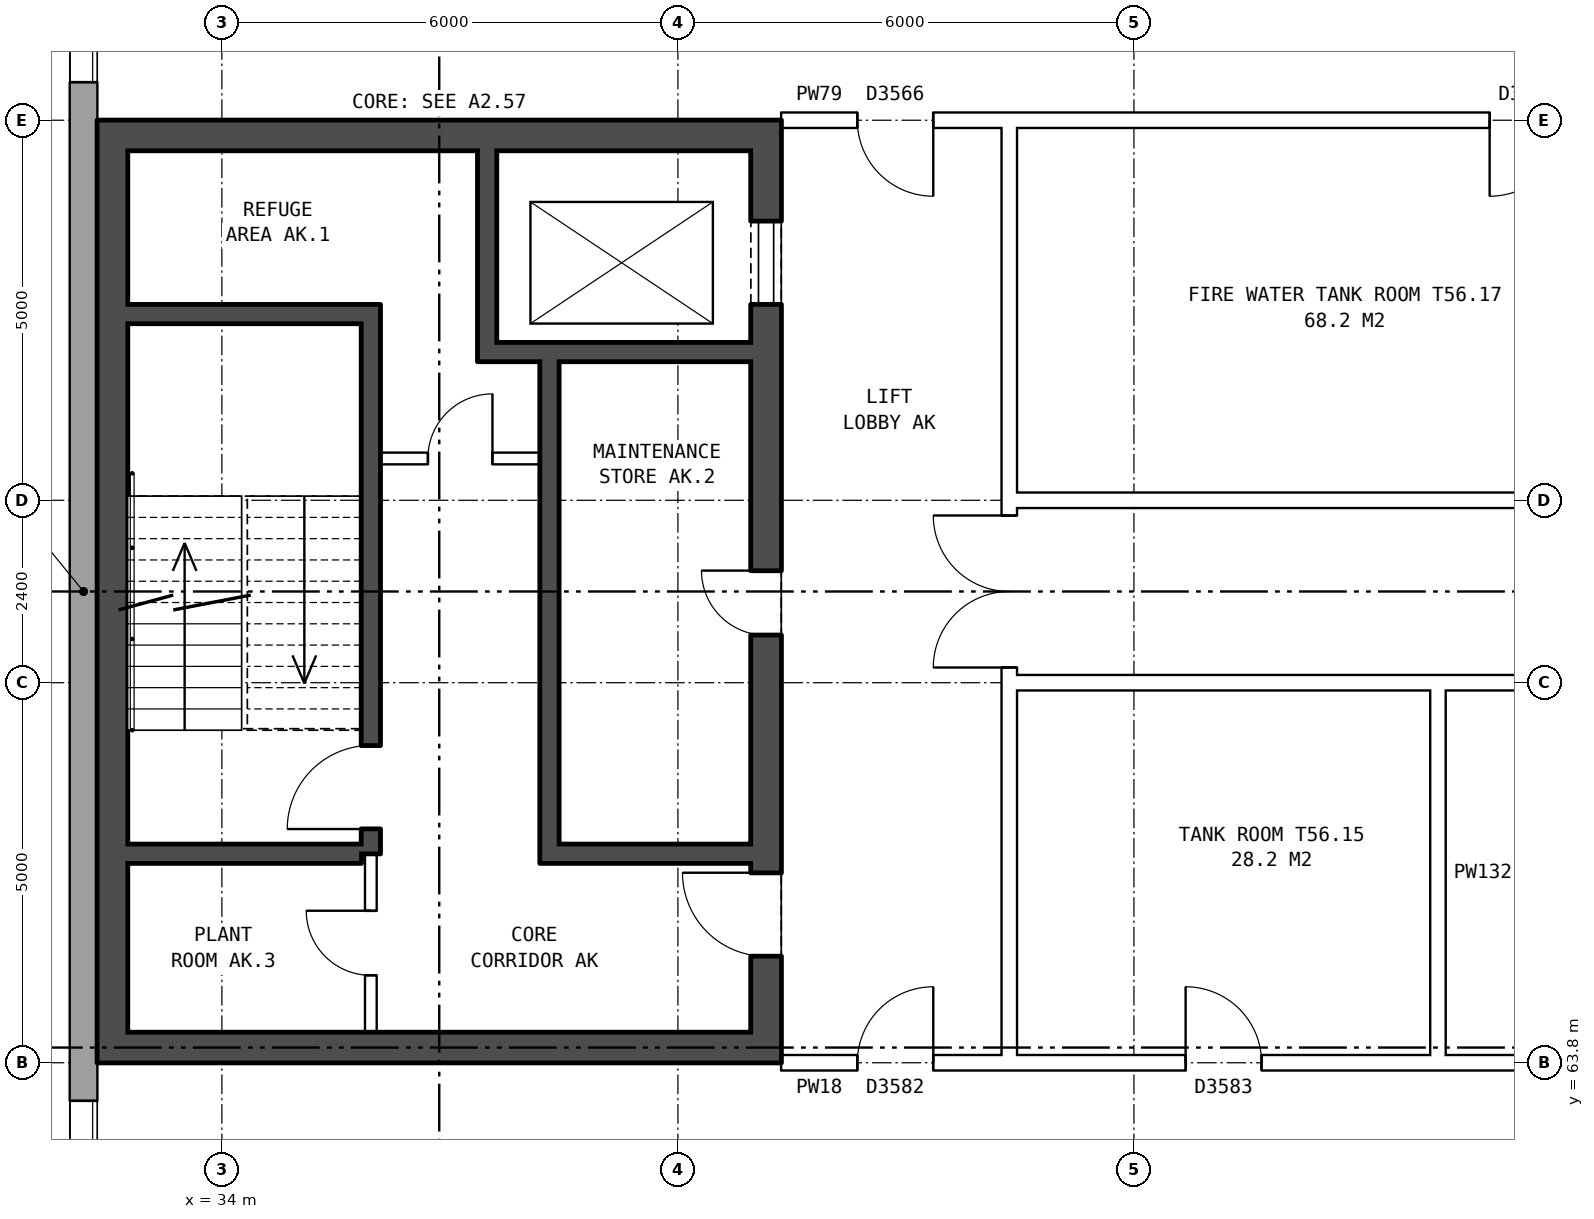
"""IFC4 building model, lengths in metres.
Left out: names, types, materials, properties, quantities, classifications, styles, units other than length and angle.
Written with IfcOpenShell. Run it as: python <this file> out.ifc"""

import sys

from ifc_helpers import new_model, si_unit, direction, frame, frame_2d, origin, place, context, subcontext, project, spatial, rectangle, extrude, element, fill, save


model = new_model("IFC4")
c1 = context("Model", 3, precision=1e-05, world=origin(), true_north=direction((0.0, 1.0)))
c2 = subcontext(c1, "Body", "Model", "MODEL_VIEW")
j1 = project(units=[si_unit("LENGTHUNIT", "METRE"), si_unit("PLANEANGLEUNIT", "RADIAN")], contexts=[c1])
p1 = place(None, origin())
s1 = spatial("IfcSite", under=j1, at=p1, CompositionType="ELEMENT")
p2 = place(p1, origin())
s2 = spatial("IfcBuilding", under=s1, at=p2, CompositionType="ELEMENT")
p3 = place(p2, frame((0.0, 0.0, 198.6)))
s3 = spatial("IfcBuildingStorey", under=s2, at=p3, CompositionType="ELEMENT", Elevation=198.6)
p4 = place(p3, frame((32.18, 82.925, 0.0), z_axis=(0.0, 0.0, 1.0), x_axis=(0.0, -1.0, 0.0)))
e1 = element("IfcWall", 1, at=p4, inside=s3, PredefinedType="STANDARD", context=c2, shape_type="SweptSolid", body=[
    extrude(rectangle(XDim=25.851, YDim=0.36, at=frame_2d((12.925, 0.0))), origin(), (0.0, 0.0, 1.0), 3.7),
])
p5 = place(p4, frame((1.625, 0.0, 1.5)))
e2 = element("IfcOpeningElement", 2, at=p5, cuts=e1, PredefinedType="OPENING", context=c2, shape_type="SweptSolid", body=[
    extrude(rectangle(XDim=1.6, YDim=1.2, at=frame_2d((0.8, 0.6))), frame((0.0, 0.19, 0.0), z_axis=(0.0, -1.0, 0.0), x_axis=(1.0, 0.0, 0.0)), (0.0, 0.0, 1.0), 0.38),
])
p6 = place(p4, frame((4.625, 0.0, 1.5)))
e3 = element("IfcOpeningElement", 3, at=p6, cuts=e1, PredefinedType="OPENING", context=c2, shape_type="SweptSolid", body=[
    extrude(rectangle(XDim=1.6, YDim=1.2, at=frame_2d((0.8, 0.6))), frame((0.0, 0.19, 0.0), z_axis=(0.0, -1.0, 0.0), x_axis=(1.0, 0.0, 0.0)), (0.0, 0.0, 1.0), 0.38),
])
p7 = place(p4, frame((19.625, 0.0, 1.5)))
e4 = element("IfcOpeningElement", 4, at=p7, cuts=e1, PredefinedType="OPENING", context=c2, shape_type="SweptSolid", body=[
    extrude(rectangle(XDim=1.6, YDim=1.2, at=frame_2d((0.8, 0.6))), frame((0.0, 0.19, 0.0), z_axis=(0.0, -1.0, 0.0), x_axis=(1.0, 0.0, 0.0)), (0.0, 0.0, 1.0), 0.38),
])
p8 = place(p4, frame((22.625, 0.0, 1.5)))
e5 = element("IfcOpeningElement", 5, at=p8, cuts=e1, PredefinedType="OPENING", context=c2, shape_type="SweptSolid", body=[
    extrude(rectangle(XDim=1.6, YDim=1.2, at=frame_2d((0.8, 0.6))), frame((0.0, 0.19, 0.0), z_axis=(0.0, -1.0, 0.0), x_axis=(1.0, 0.0, 0.0)), (0.0, 0.0, 1.0), 0.38),
])
p9 = place(p3, frame((41.16, 76.2, 0.0), z_axis=(0.0, 0.0, 1.0), x_axis=(0.0, -1.0, 0.0)))
e6 = element("IfcWall", 6, at=p9, inside=s3, PredefinedType="SHEAR", context=c2, shape_type="SweptSolid", body=[
    extrude(rectangle(XDim=12.4, YDim=0.4, at=frame_2d((6.2, 0.0))), origin(), (0.0, 0.0, 1.0), 3.7),
])
p10 = place(p9, frame((1.325, 0.0, 0.0)))
e7 = element("IfcOpeningElement", 7, at=p10, cuts=e6, PredefinedType="OPENING", context=c2, shape_type="SweptSolid", body=[
    extrude(rectangle(XDim=1.1, YDim=2.1, at=frame_2d((0.55, 1.05))), frame((0.0, 0.21, 0.0), z_axis=(0.0, -1.0, 0.0), x_axis=(1.0, 0.0, 0.0)), (0.0, 0.0, 1.0), 0.42),
])
p11 = place(p9, frame((5.925, 0.0, 0.0)))
e8 = element("IfcOpeningElement", 8, at=p11, cuts=e6, PredefinedType="OPENING", context=c2, shape_type="SweptSolid", body=[
    extrude(rectangle(XDim=0.85, YDim=2.1, at=frame_2d((0.425, 1.05))), frame((0.0, 0.21, 0.0), z_axis=(0.0, -1.0, 0.0), x_axis=(1.0, 0.0, 0.0)), (0.0, 0.0, 1.0), 0.42),
])
p12 = place(p9, frame((9.9, 0.0, 0.0)))
e9 = element("IfcOpeningElement", 9, at=p12, cuts=e6, PredefinedType="OPENING", context=c2, shape_type="SweptSolid", body=[
    extrude(rectangle(XDim=1.1, YDim=2.1, at=frame_2d((0.55, 1.05))), frame((0.0, 0.21, 0.0), z_axis=(0.0, -1.0, 0.0), x_axis=(1.0, 0.0, 0.0)), (0.0, 0.0, 1.0), 0.42),
])
p13 = place(p3, frame((32.56, 76.2, 0.0), z_axis=(0.0, 0.0, 1.0), x_axis=(0.0, -1.0, 0.0)))
e10 = element("IfcWall", 10, at=p13, inside=s3, PredefinedType="SHEAR", context=c2, shape_type="SweptSolid", body=[
    extrude(rectangle(XDim=12.4, YDim=0.4, at=frame_2d((6.2, 0.0))), origin(), (0.0, 0.0, 1.0), 3.7),
])
for number, where, z_axis, x_axis in (
    (11, (40.96, 76.0, 0.0), (0.0, 0.0, 1.0), (-1.0, 0.0, 0.0)),
    (12, (40.96, 64.0, 0.0), (0.0, 0.0, 1.0), (-1.0, 0.0, 0.0)),
):
    element("IfcWall", number, at=place(p3, frame(where, z_axis=z_axis, x_axis=x_axis)), inside=s3, PredefinedType="SHEAR", context=c2, shape_type="SweptSolid", body=[
        extrude(rectangle(XDim=8.2, YDim=0.4, at=frame_2d((4.1, 0.0))), origin(), (0.0, 0.0, 1.0), 3.7),
    ])
p14 = place(p3, frame((35.835, 73.65, 0.0), z_axis=(0.0, 0.0, 1.0), x_axis=(-1.0, 0.0, 0.0)))
e13 = element("IfcWall", 13, at=p14, inside=s3, PredefinedType="SHEAR", context=c2, shape_type="SweptSolid", body=[
    extrude(rectangle(XDim=3.075, YDim=0.25, at=frame_2d((1.538, 0.0))), origin(), (0.0, 0.0, 1.0), 3.7),
])
p15 = place(p3, frame((40.96, 73.15, 0.0), z_axis=(0.0, 0.0, 1.0), x_axis=(-1.0, 0.0, 0.0)))
e14 = element("IfcWall", 14, at=p15, inside=s3, PredefinedType="SHEAR", context=c2, shape_type="SweptSolid", body=[
    extrude(rectangle(XDim=3.595, YDim=0.25, at=frame_2d((1.797, 0.0))), origin(), (0.0, 0.0, 1.0), 3.7),
])
p16 = place(p3, frame((38.185, 71.75, 0.0), z_axis=(0.0, 0.0, 1.0), x_axis=(-1.0, 0.0, 0.0)))
e15 = element("IfcWall", 15, at=p16, inside=s3, PredefinedType="PARTITIONING", context=c2, shape_type="SweptSolid", body=[
    extrude(rectangle(XDim=2.1, YDim=0.15, at=frame_2d((1.05, 0.0))), origin(), (0.0, 0.0, 1.0), 3.7),
])
p17 = place(p16, frame((0.625, 0.0, 0.0)))
e16 = element("IfcOpeningElement", 16, at=p17, cuts=e15, PredefinedType="OPENING", context=c2, shape_type="SweptSolid", body=[
    extrude(rectangle(XDim=0.85, YDim=2.1, at=frame_2d((0.425, 1.05))), frame((0.0, 0.085, 0.0), z_axis=(0.0, -1.0, 0.0), x_axis=(1.0, 0.0, 0.0)), (0.0, 0.0, 1.0), 0.17),
])
p18 = place(p3, frame((40.96, 66.55, 0.0), z_axis=(0.0, 0.0, 1.0), x_axis=(-1.0, 0.0, 0.0)))
e17 = element("IfcWall", 17, at=p18, inside=s3, PredefinedType="SHEAR", context=c2, shape_type="SweptSolid", body=[
    extrude(rectangle(XDim=2.525, YDim=0.25, at=frame_2d((1.262, 0.0))), origin(), (0.0, 0.0, 1.0), 3.7),
])
p19 = place(p3, frame((35.835, 66.55, 0.0), z_axis=(0.0, 0.0, 1.0), x_axis=(-1.0, 0.0, 0.0)))
e18 = element("IfcWall", 18, at=p19, inside=s3, PredefinedType="SHEAR", context=c2, shape_type="SweptSolid", body=[
    extrude(rectangle(XDim=3.075, YDim=0.25, at=frame_2d((1.538, 0.0))), origin(), (0.0, 0.0, 1.0), 3.7),
])
p20 = place(p3, frame((38.31, 73.025, 0.0), z_axis=(0.0, 0.0, 1.0), x_axis=(0.0, -1.0, 0.0)))
e19 = element("IfcWall", 19, at=p20, inside=s3, PredefinedType="SHEAR", context=c2, shape_type="SweptSolid", body=[
    extrude(rectangle(XDim=6.6, YDim=0.25, at=frame_2d((3.3, 0.0))), origin(), (0.0, 0.0, 1.0), 3.7),
])
p21 = place(p3, frame((37.49, 75.8, 0.0), z_axis=(0.0, 0.0, 1.0), x_axis=(0.0, -1.0, 0.0)))
e20 = element("IfcWall", 20, at=p21, inside=s3, PredefinedType="SHEAR", context=c2, shape_type="SweptSolid", body=[
    extrude(rectangle(XDim=2.525, YDim=0.25, at=frame_2d((1.263, 0.0))), origin(), (0.0, 0.0, 1.0), 3.7),
])
p22 = place(p3, frame((35.96, 73.775, 0.0), z_axis=(0.0, 0.0, 1.0), x_axis=(0.0, -1.0, 0.0)))
e21 = element("IfcWall", 21, at=p22, inside=s3, PredefinedType="SHEAR", context=c2, shape_type="SweptSolid", body=[
    extrude(rectangle(XDim=7.225, YDim=0.25, at=frame_2d((3.612, 0.0))), origin(), (0.0, 0.0, 1.0), 3.7),
])
p23 = place(p22, frame((5.8, 0.0, 0.0)))
e22 = element("IfcOpeningElement", 22, at=p23, cuts=e21, PredefinedType="OPENING", context=c2, shape_type="SweptSolid", body=[
    extrude(rectangle(XDim=1.1, YDim=2.1, at=frame_2d((0.55, 1.05))), frame((0.0, 0.135, 0.0), z_axis=(0.0, -1.0, 0.0), x_axis=(1.0, 0.0, 0.0)), (0.0, 0.0, 1.0), 0.27),
])
p24 = place(p3, frame((35.96, 66.55, 0.0), z_axis=(0.0, 0.0, 1.0), x_axis=(0.0, -1.0, 0.0)))
e23 = element("IfcWall", 23, at=p24, inside=s3, PredefinedType="PARTITIONING", context=c2, shape_type="SweptSolid", body=[
    extrude(rectangle(XDim=2.35, YDim=0.15, at=frame_2d((1.175, 0.0))), origin(), (0.0, 0.0, 1.0), 3.7),
])
p25 = place(p24, frame((0.75, 0.0, 0.0)))
e24 = element("IfcOpeningElement", 24, at=p25, cuts=e23, PredefinedType="OPENING", context=c2, shape_type="SweptSolid", body=[
    extrude(rectangle(XDim=0.85, YDim=2.1, at=frame_2d((0.425, 1.05))), frame((0.0, 0.085, 0.0), z_axis=(0.0, -1.0, 0.0), x_axis=(1.0, 0.0, 0.0)), (0.0, 0.0, 1.0), 0.17),
])
p26 = place(p3, frame((44.36, 63.9, 0.0), z_axis=(0.0, 0.0, 1.0), x_axis=(0.0, 1.0, 0.0)))
e25 = element("IfcWall", 25, at=p26, inside=s3, PredefinedType="PARTITIONING", context=c2, shape_type="SweptSolid", body=[
    extrude(rectangle(XDim=12.2, YDim=0.2, at=frame_2d((6.1, 0.0))), origin(), (0.0, 0.0, 1.0), 3.7),
])
p27 = place(p26, frame((5.1, 0.0, 0.0)))
e26 = element("IfcOpeningElement", 26, at=p27, cuts=e25, PredefinedType="OPENING", context=c2, shape_type="SweptSolid", body=[
    extrude(rectangle(XDim=2.0, YDim=2.1, at=frame_2d((1.0, 1.05))), frame((0.0, 0.11, 0.0), z_axis=(0.0, -1.0, 0.0), x_axis=(1.0, 0.0, 0.0)), (0.0, 0.0, 1.0), 0.22),
])
p28 = place(p3, frame((44.36, 63.8, 0.0), z_axis=(0.0, 0.0, 1.0), x_axis=(1.0, 0.0, 0.0)))
e27 = element("IfcWall", 27, at=p28, inside=s3, PredefinedType="PARTITIONING", context=c2, shape_type="SweptSolid", body=[
    extrude(rectangle(XDim=19.28, YDim=0.2, at=frame_2d((9.64, 0.0))), origin(), (0.0, 0.0, 1.0), 3.7),
])
p29 = place(p28, frame((2.32, 0.0, 0.0)))
e28 = element("IfcOpeningElement", 28, at=p29, cuts=e27, PredefinedType="OPENING", context=c2, shape_type="SweptSolid", body=[
    extrude(rectangle(XDim=1.0, YDim=2.1, at=frame_2d((0.5, 1.05))), frame((0.0, 0.11, 0.0), z_axis=(0.0, -1.0, 0.0), x_axis=(1.0, 0.0, 0.0)), (0.0, 0.0, 1.0), 0.22),
])
p30 = place(p28, frame((11.96, 0.0, 0.0)))
e29 = element("IfcOpeningElement", 29, at=p30, cuts=e27, PredefinedType="OPENING", context=c2, shape_type="SweptSolid", body=[
    extrude(rectangle(XDim=1.0, YDim=2.1, at=frame_2d((0.5, 1.05))), frame((0.0, 0.11, 0.0), z_axis=(0.0, -1.0, 0.0), x_axis=(1.0, 0.0, 0.0)), (0.0, 0.0, 1.0), 0.22),
])
p31 = place(p3, frame((41.36, 63.8, 0.0), z_axis=(0.0, 0.0, 1.0), x_axis=(1.0, 0.0, 0.0)))
e30 = element("IfcWall", 30, at=p31, inside=s3, PredefinedType="PARTITIONING", context=c2, shape_type="SweptSolid", body=[
    extrude(rectangle(XDim=3.0, YDim=0.2, at=frame_2d((1.5, 0.0))), origin(), (0.0, 0.0, 1.0), 3.7),
])
p32 = place(p31, frame((1.0, 0.0, 0.0)))
e31 = element("IfcOpeningElement", 31, at=p32, cuts=e30, PredefinedType="OPENING", context=c2, shape_type="SweptSolid", body=[
    extrude(rectangle(XDim=1.0, YDim=2.1, at=frame_2d((0.5, 1.05))), frame((0.0, 0.11, 0.0), z_axis=(0.0, -1.0, 0.0), x_axis=(1.0, 0.0, 0.0)), (0.0, 0.0, 1.0), 0.22),
])
for number, where, z_axis, x_axis in (
    (32, (44.36, 68.8, 0.0), (0.0, 0.0, 1.0), (1.0, 0.0, 0.0)),
    (33, (44.36, 71.2, 0.0), (0.0, 0.0, 1.0), (1.0, 0.0, 0.0)),
):
    element("IfcWall", number, at=place(p3, frame(where, z_axis=z_axis, x_axis=x_axis)), inside=s3, PredefinedType="PARTITIONING", context=c2, shape_type="SweptSolid", body=[
        extrude(rectangle(XDim=19.28, YDim=0.2, at=frame_2d((9.64, 0.0))), origin(), (0.0, 0.0, 1.0), 3.7),
    ])
p33 = place(p3, frame((44.36, 76.2, 0.0), z_axis=(0.0, 0.0, 1.0), x_axis=(1.0, 0.0, 0.0)))
e34 = element("IfcWall", 34, at=p33, inside=s3, PredefinedType="PARTITIONING", context=c2, shape_type="SweptSolid", body=[
    extrude(rectangle(XDim=19.28, YDim=0.2, at=frame_2d((9.64, 0.0))), origin(), (0.0, 0.0, 1.0), 3.7),
])
p34 = place(p33, frame((6.32, 0.0, 0.0)))
e35 = element("IfcOpeningElement", 35, at=p34, cuts=e34, PredefinedType="OPENING", context=c2, shape_type="SweptSolid", body=[
    extrude(rectangle(XDim=1.0, YDim=2.1, at=frame_2d((0.5, 1.05))), frame((0.0, 0.11, 0.0), z_axis=(0.0, -1.0, 0.0), x_axis=(1.0, 0.0, 0.0)), (0.0, 0.0, 1.0), 0.22),
])
p35 = place(p33, frame((15.96, 0.0, 0.0)))
e36 = element("IfcOpeningElement", 36, at=p35, cuts=e34, PredefinedType="OPENING", context=c2, shape_type="SweptSolid", body=[
    extrude(rectangle(XDim=1.0, YDim=2.1, at=frame_2d((0.5, 1.05))), frame((0.0, 0.11, 0.0), z_axis=(0.0, -1.0, 0.0), x_axis=(1.0, 0.0, 0.0)), (0.0, 0.0, 1.0), 0.22),
])
p36 = place(p3, frame((41.36, 76.2, 0.0), z_axis=(0.0, 0.0, 1.0), x_axis=(1.0, 0.0, 0.0)))
e37 = element("IfcWall", 37, at=p36, inside=s3, PredefinedType="PARTITIONING", context=c2, shape_type="SweptSolid", body=[
    extrude(rectangle(XDim=3.0, YDim=0.2, at=frame_2d((1.5, 0.0))), origin(), (0.0, 0.0, 1.0), 3.7),
])
p37 = place(p36, frame((1.0, 0.0, 0.0)))
e38 = element("IfcOpeningElement", 38, at=p37, cuts=e37, PredefinedType="OPENING", context=c2, shape_type="SweptSolid", body=[
    extrude(rectangle(XDim=1.0, YDim=2.1, at=frame_2d((0.5, 1.05))), frame((0.0, 0.11, 0.0), z_axis=(0.0, -1.0, 0.0), x_axis=(1.0, 0.0, 0.0)), (0.0, 0.0, 1.0), 0.22),
])
p38 = place(p3, frame((50.0, 63.7, 0.0), z_axis=(0.0, 0.0, 1.0), x_axis=(0.0, 1.0, 0.0)))
e39 = element("IfcWall", 39, at=p38, inside=s3, PredefinedType="PARTITIONING", context=c2, shape_type="SweptSolid", body=[
    extrude(rectangle(XDim=5.2, YDim=0.2, at=frame_2d((2.6, 0.0))), origin(), (0.0, 0.0, 1.0), 3.7),
])
p39 = place(p6, origin())
e40 = element("IfcWindow", 40, at=p39, inside=s3, PartitioningType="DOUBLE_PANEL_HORIZONTAL", PredefinedType="WINDOW", context=c2, shape_type="SweptSolid", body=[
    extrude(rectangle(XDim=1.6, YDim=1.2, at=frame_2d((0.8, 0.6))), frame((0.0, 0.15, 0.0), z_axis=(0.0, -1.0, 0.0), x_axis=(1.0, 0.0, 0.0)), (0.0, 0.0, 1.0), 0.06),
])
fill(e3, e40)
p40 = place(p7, origin())
e41 = element("IfcWindow", 41, at=p40, inside=s3, PartitioningType="DOUBLE_PANEL_HORIZONTAL", PredefinedType="WINDOW", context=c2, shape_type="SweptSolid", body=[
    extrude(rectangle(XDim=1.6, YDim=1.2, at=frame_2d((0.8, 0.6))), frame((0.0, 0.15, 0.0), z_axis=(0.0, -1.0, 0.0), x_axis=(1.0, 0.0, 0.0)), (0.0, 0.0, 1.0), 0.06),
])
fill(e4, e41)
p41 = place(p10, origin())
e42 = element("IfcDoor", 42, at=p41, inside=s3, OperationType="DOUBLE_DOOR_SLIDING", PredefinedType="DOOR", context=c2, shape_type="SweptSolid", body=[
    extrude(rectangle(XDim=1.1, YDim=2.1, at=frame_2d((0.55, 1.05))), frame((0.0, -0.135, 0.0), z_axis=(0.0, -1.0, 0.0), x_axis=(1.0, 0.0, 0.0)), (0.0, 0.0, 1.0), 0.05),
])
fill(e7, e42)
p42 = place(p11, frame((0.85, 0.0, 0.0), z_axis=(0.0, 0.0, 1.0), x_axis=(-1.0, 0.0, 0.0)))
e43 = element("IfcDoor", 43, at=p42, inside=s3, OperationType="SINGLE_SWING_RIGHT", PredefinedType="DOOR", context=c2, shape_type="SweptSolid", body=[
    extrude(rectangle(XDim=0.85, YDim=2.1, at=frame_2d((0.425, 1.05))), frame((0.0, 0.185, 0.0), z_axis=(0.0, -1.0, 0.0), x_axis=(1.0, 0.0, 0.0)), (0.0, 0.0, 1.0), 0.05),
])
fill(e8, e43)
p43 = place(p12, frame((1.1, 0.0, 0.0), z_axis=(0.0, 0.0, 1.0), x_axis=(-1.0, 0.0, 0.0)))
e44 = element("IfcDoor", 44, at=p43, inside=s3, OperationType="SINGLE_SWING_RIGHT", PredefinedType="DOOR", context=c2, shape_type="SweptSolid", body=[
    extrude(rectangle(XDim=1.1, YDim=2.1, at=frame_2d((0.55, 1.05))), frame((0.0, 0.185, 0.0), z_axis=(0.0, -1.0, 0.0), x_axis=(1.0, 0.0, 0.0)), (0.0, 0.0, 1.0), 0.05),
])
fill(e9, e44)
p44 = place(p23, frame((1.1, 0.0, 0.0), z_axis=(0.0, 0.0, 1.0), x_axis=(-1.0, 0.0, 0.0)))
e45 = element("IfcDoor", 45, at=p44, inside=s3, OperationType="SINGLE_SWING_LEFT", PredefinedType="DOOR", context=c2, shape_type="SweptSolid", body=[
    extrude(rectangle(XDim=1.1, YDim=2.1, at=frame_2d((0.55, 1.05))), frame((0.0, 0.025, 0.0), z_axis=(0.0, -1.0, 0.0), x_axis=(1.0, 0.0, 0.0)), (0.0, 0.0, 1.0), 0.05),
])
fill(e22, e45)
p45 = place(p17, frame((0.85, 0.0, 0.0), z_axis=(0.0, 0.0, 1.0), x_axis=(-1.0, 0.0, 0.0)))
e46 = element("IfcDoor", 46, at=p45, inside=s3, OperationType="SINGLE_SWING_RIGHT", PredefinedType="DOOR", context=c2, shape_type="SweptSolid", body=[
    extrude(rectangle(XDim=0.85, YDim=2.1, at=frame_2d((0.425, 1.05))), frame((0.0, 0.025, 0.0), z_axis=(0.0, -1.0, 0.0), x_axis=(1.0, 0.0, 0.0)), (0.0, 0.0, 1.0), 0.05),
])
fill(e16, e46)
p46 = place(p25, frame((0.85, 0.0, 0.0), z_axis=(0.0, 0.0, 1.0), x_axis=(-1.0, 0.0, 0.0)))
e47 = element("IfcDoor", 47, at=p46, inside=s3, OperationType="SINGLE_SWING_RIGHT", PredefinedType="DOOR", context=c2, shape_type="SweptSolid", body=[
    extrude(rectangle(XDim=0.85, YDim=2.1, at=frame_2d((0.425, 1.05))), frame((0.0, 0.025, 0.0), z_axis=(0.0, -1.0, 0.0), x_axis=(1.0, 0.0, 0.0)), (0.0, 0.0, 1.0), 0.05),
])
fill(e24, e47)
p47 = place(p27, origin())
e48 = element("IfcDoor", 48, at=p47, inside=s3, OperationType="DOUBLE_DOOR_SINGLE_SWING", PredefinedType="DOOR", context=c2, shape_type="SweptSolid", body=[
    extrude(rectangle(XDim=2.0, YDim=2.1, at=frame_2d((1.0, 1.05))), frame((0.0, 0.025, 0.0), z_axis=(0.0, -1.0, 0.0), x_axis=(1.0, 0.0, 0.0)), (0.0, 0.0, 1.0), 0.05),
])
fill(e26, e48)
p48 = place(p29, origin())
e49 = element("IfcDoor", 49, at=p48, inside=s3, OperationType="SINGLE_SWING_LEFT", PredefinedType="DOOR", context=c2, shape_type="SweptSolid", body=[
    extrude(rectangle(XDim=1.0, YDim=2.1, at=frame_2d((0.5, 1.05))), frame((0.0, 0.025, 0.0), z_axis=(0.0, -1.0, 0.0), x_axis=(1.0, 0.0, 0.0)), (0.0, 0.0, 1.0), 0.05),
])
fill(e28, e49)
p49 = place(p32, origin())
e50 = element("IfcDoor", 50, at=p49, inside=s3, OperationType="SINGLE_SWING_RIGHT", PredefinedType="DOOR", context=c2, shape_type="SweptSolid", body=[
    extrude(rectangle(XDim=1.0, YDim=2.1, at=frame_2d((0.5, 1.05))), frame((0.0, 0.025, 0.0), z_axis=(0.0, -1.0, 0.0), x_axis=(1.0, 0.0, 0.0)), (0.0, 0.0, 1.0), 0.05),
])
fill(e31, e50)
p50 = place(p34, frame((1.0, 0.0, 0.0), z_axis=(0.0, 0.0, 1.0), x_axis=(-1.0, 0.0, 0.0)))
e51 = element("IfcDoor", 51, at=p50, inside=s3, OperationType="SINGLE_SWING_RIGHT", PredefinedType="DOOR", context=c2, shape_type="SweptSolid", body=[
    extrude(rectangle(XDim=1.0, YDim=2.1, at=frame_2d((0.5, 1.05))), frame((0.0, 0.025, 0.0), z_axis=(0.0, -1.0, 0.0), x_axis=(1.0, 0.0, 0.0)), (0.0, 0.0, 1.0), 0.05),
])
fill(e35, e51)
p51 = place(p37, frame((1.0, 0.0, 0.0), z_axis=(0.0, 0.0, 1.0), x_axis=(-1.0, 0.0, 0.0)))
e52 = element("IfcDoor", 52, at=p51, inside=s3, OperationType="SINGLE_SWING_LEFT", PredefinedType="DOOR", context=c2, shape_type="SweptSolid", body=[
    extrude(rectangle(XDim=1.0, YDim=2.1, at=frame_2d((0.5, 1.05))), frame((0.0, 0.025, 0.0), z_axis=(0.0, -1.0, 0.0), x_axis=(1.0, 0.0, 0.0)), (0.0, 0.0, 1.0), 0.05),
])
fill(e38, e52)
save(model, sys.argv[1])
